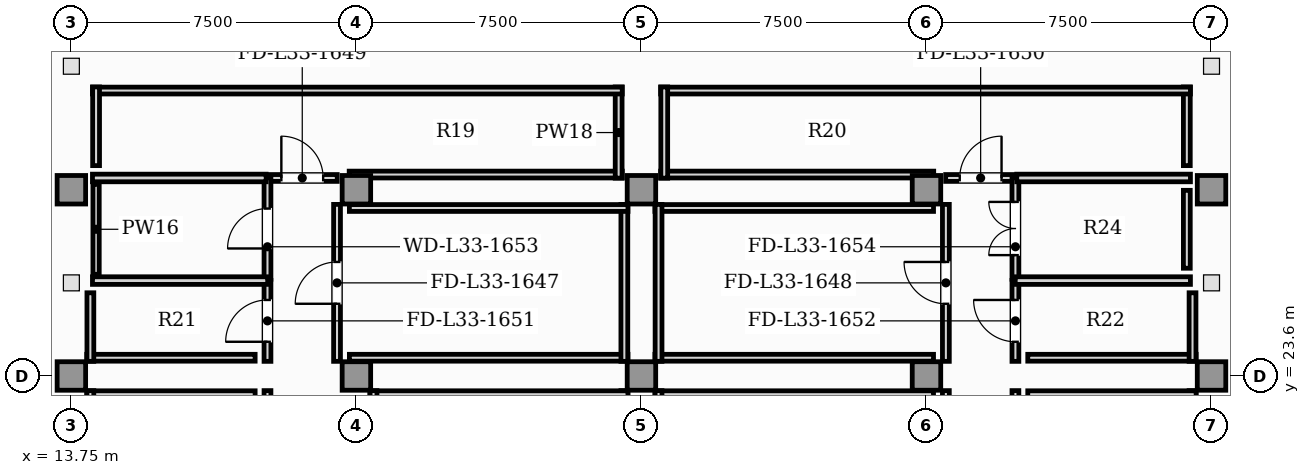
"""IFC4 building model, lengths in metres.
Left out: names, types, materials, properties, quantities, classifications, styles, units other than length and angle.
Written with IfcOpenShell. Run it as: python <this file> out.ifc"""

import sys

from ifc_helpers import new_model, si_unit, direction, frame, frame_2d, origin, origin_2d, place, context, subcontext, project, spatial, rectangle, extrude, element, fill, save


model = new_model("IFC4")
c1 = context("Model", 3, precision=1e-05, world=origin(), true_north=direction((0.0, 1.0)))
c2 = subcontext(c1, "Body", "Model", "MODEL_VIEW")
j1 = project(units=[si_unit("LENGTHUNIT", "METRE"), si_unit("PLANEANGLEUNIT", "RADIAN")], contexts=[c1])
p1 = place(None, origin())
s1 = spatial("IfcSite", under=j1, at=p1, CompositionType="ELEMENT")
p2 = place(p1, origin())
s2 = spatial("IfcBuilding", under=s1, at=p2, CompositionType="ELEMENT")
p3 = place(p2, frame((0.0, 0.0, 134.95)))
s3 = spatial("IfcBuildingStorey", under=s2, at=p3, CompositionType="ELEMENT", Elevation=134.95)
for number, where, z_axis, x_axis in (
    (1, (13.75, 23.6, 0.0), (0.0, 0.0, 1.0), (1.0, 0.0, 0.0)),
    (2, (21.25, 23.6, 0.0), (0.0, 0.0, 1.0), (1.0, 0.0, 0.0)),
    (3, (28.75, 23.6, 0.0), (0.0, 0.0, 1.0), (1.0, 0.0, 0.0)),
    (4, (36.25, 23.6, 0.0), (0.0, 0.0, 1.0), (1.0, 0.0, 0.0)),
    (5, (43.75, 23.6, 0.0), (0.0, 0.0, 1.0), (1.0, 0.0, 0.0)),
    (6, (13.75, 28.5, 0.0), (0.0, 0.0, 1.0), (1.0, 0.0, 0.0)),
    (7, (21.25, 28.5, 0.0), (0.0, 0.0, 1.0), (1.0, 0.0, 0.0)),
    (8, (28.75, 28.5, 0.0), (0.0, 0.0, 1.0), (1.0, 0.0, 0.0)),
    (9, (36.25, 28.5, 0.0), (0.0, 0.0, 1.0), (1.0, 0.0, 0.0)),
    (10, (43.75, 28.5, 0.0), (0.0, 0.0, 1.0), (1.0, 0.0, 0.0)),
):
    element("IfcColumn", number, at=place(p3, frame(where, z_axis=z_axis, x_axis=x_axis)), inside=s3, PredefinedType="COLUMN", context=c2, shape_type="SweptSolid", body=[
        extrude(rectangle(XDim=0.75, YDim=0.75, at=origin_2d()), origin(), (0.0, 0.0, 1.0), 5.2),
    ])
p4 = place(p3, frame((18.91, 13.885, 0.0), z_axis=(0.0, 0.0, 1.0), x_axis=(0.0, 1.0, 0.0)))
e11 = element("IfcWall", 11, at=p4, inside=s3, PredefinedType="PARTITIONING", context=c2, shape_type="SweptSolid", body=[
    extrude(rectangle(XDim=9.33, YDim=0.18, at=frame_2d((4.665, 0.0))), origin(), (0.0, 0.0, 1.0), 4.92),
])
p5 = place(p4, frame((4.115, 0.0, 0.0)))
e12 = element("IfcOpeningElement", 12, at=p5, cuts=e11, PredefinedType="OPENING", context=c2, shape_type="SweptSolid", body=[
    extrude(rectangle(XDim=1.1, YDim=2.2, at=frame_2d((0.55, 1.1))), frame((0.0, 0.1, 0.0), z_axis=(0.0, -1.0, 0.0), x_axis=(1.0, 0.0, 0.0)), (0.0, 0.0, 1.0), 0.2),
])
p6 = place(p3, frame((36.76, 13.885, 0.0), z_axis=(0.0, 0.0, 1.0), x_axis=(0.0, 1.0, 0.0)))
e13 = element("IfcWall", 13, at=p6, inside=s3, PredefinedType="PARTITIONING", context=c2, shape_type="SweptSolid", body=[
    extrude(rectangle(XDim=9.33, YDim=0.18, at=frame_2d((4.665, 0.0))), origin(), (0.0, 0.0, 1.0), 4.92),
])
p7 = place(p6, frame((4.115, 0.0, 0.0)))
e14 = element("IfcOpeningElement", 14, at=p7, cuts=e13, PredefinedType="OPENING", context=c2, shape_type="SweptSolid", body=[
    extrude(rectangle(XDim=1.1, YDim=2.2, at=frame_2d((0.55, 1.1))), frame((0.0, 0.1, 0.0), z_axis=(0.0, -1.0, 0.0), x_axis=(1.0, 0.0, 0.0)), (0.0, 0.0, 1.0), 0.2),
])
p8 = place(p3, frame((38.59, 13.885, 0.0), z_axis=(0.0, 0.0, 1.0), x_axis=(0.0, 1.0, 0.0)))
e15 = element("IfcWall", 15, at=p8, inside=s3, PredefinedType="PARTITIONING", context=c2, shape_type="SweptSolid", body=[
    extrude(rectangle(XDim=9.33, YDim=0.18, at=frame_2d((4.665, 0.0))), origin(), (0.0, 0.0, 1.0), 4.92),
])
p9 = place(p8, frame((4.115, 0.0, 0.0)))
e16 = element("IfcOpeningElement", 16, at=p9, cuts=e15, PredefinedType="OPENING", context=c2, shape_type="SweptSolid", body=[
    extrude(rectangle(XDim=1.1, YDim=2.2, at=frame_2d((0.55, 1.1))), frame((0.0, 0.1, 0.0), z_axis=(0.0, -1.0, 0.0), x_axis=(1.0, 0.0, 0.0)), (0.0, 0.0, 1.0), 0.2),
])
p10 = place(p3, frame((20.74, 23.985, 0.0), z_axis=(0.0, 0.0, 1.0), x_axis=(0.0, 1.0, 0.0)))
e17 = element("IfcWall", 17, at=p10, inside=s3, PredefinedType="PARTITIONING", context=c2, shape_type="SweptSolid", body=[
    extrude(rectangle(XDim=4.13, YDim=0.18, at=frame_2d((2.065, 0.0))), origin(), (0.0, 0.0, 1.0), 4.92),
])
p11 = place(p10, frame((1.515, 0.0, 0.0)))
e18 = element("IfcOpeningElement", 18, at=p11, cuts=e17, PredefinedType="OPENING", context=c2, shape_type="SweptSolid", body=[
    extrude(rectangle(XDim=1.1, YDim=2.2, at=frame_2d((0.55, 1.1))), frame((0.0, 0.1, 0.0), z_axis=(0.0, -1.0, 0.0), x_axis=(1.0, 0.0, 0.0)), (0.0, 0.0, 1.0), 0.2),
])
p12 = place(p3, frame((36.76, 23.985, 0.0), z_axis=(0.0, 0.0, 1.0), x_axis=(0.0, 1.0, 0.0)))
e19 = element("IfcWall", 19, at=p12, inside=s3, PredefinedType="PARTITIONING", context=c2, shape_type="SweptSolid", body=[
    extrude(rectangle(XDim=4.13, YDim=0.18, at=frame_2d((2.065, 0.0))), origin(), (0.0, 0.0, 1.0), 4.92),
])
p13 = place(p12, frame((1.515, 0.0, 0.0)))
e20 = element("IfcOpeningElement", 20, at=p13, cuts=e19, PredefinedType="OPENING", context=c2, shape_type="SweptSolid", body=[
    extrude(rectangle(XDim=1.1, YDim=2.2, at=frame_2d((0.55, 1.1))), frame((0.0, 0.1, 0.0), z_axis=(0.0, -1.0, 0.0), x_axis=(1.0, 0.0, 0.0)), (0.0, 0.0, 1.0), 0.2),
])
p14 = place(p3, frame((18.905, 28.81, 0.0), z_axis=(0.0, 0.0, 1.0), x_axis=(1.0, 0.0, 0.0)))
e21 = element("IfcWall", 21, at=p14, inside=s3, PredefinedType="PARTITIONING", context=c2, shape_type="SweptSolid", body=[
    extrude(rectangle(XDim=1.84, YDim=0.18, at=frame_2d((0.92, 0.0))), origin(), (0.0, 0.0, 1.0), 4.92),
])
p15 = place(p14, frame((0.37, 0.0, 0.0)))
e22 = element("IfcOpeningElement", 22, at=p15, cuts=e21, PredefinedType="OPENING", context=c2, shape_type="SweptSolid", body=[
    extrude(rectangle(XDim=1.1, YDim=2.2, at=frame_2d((0.55, 1.1))), frame((0.0, 0.1, 0.0), z_axis=(0.0, -1.0, 0.0), x_axis=(1.0, 0.0, 0.0)), (0.0, 0.0, 1.0), 0.2),
])
p16 = place(p3, frame((36.755, 28.81, 0.0), z_axis=(0.0, 0.0, 1.0), x_axis=(1.0, 0.0, 0.0)))
e23 = element("IfcWall", 23, at=p16, inside=s3, PredefinedType="PARTITIONING", context=c2, shape_type="SweptSolid", body=[
    extrude(rectangle(XDim=1.84, YDim=0.18, at=frame_2d((0.92, 0.0))), origin(), (0.0, 0.0, 1.0), 4.92),
])
p17 = place(p16, frame((0.37, 0.0, 0.0)))
e24 = element("IfcOpeningElement", 24, at=p17, cuts=e23, PredefinedType="OPENING", context=c2, shape_type="SweptSolid", body=[
    extrude(rectangle(XDim=1.1, YDim=2.2, at=frame_2d((0.55, 1.1))), frame((0.0, 0.1, 0.0), z_axis=(0.0, -1.0, 0.0), x_axis=(1.0, 0.0, 0.0)), (0.0, 0.0, 1.0), 0.2),
])
p18 = place(p3, frame((18.91, 23.985, 0.0), z_axis=(0.0, 0.0, 1.0), x_axis=(0.0, 1.0, 0.0)))
e25 = element("IfcWall", 25, at=p18, inside=s3, PredefinedType="PARTITIONING", context=c2, shape_type="SweptSolid", body=[
    extrude(rectangle(XDim=2.13, YDim=0.18, at=frame_2d((1.065, 0.0))), origin(), (0.0, 0.0, 1.0), 4.92),
])
p19 = place(p18, frame((0.515, 0.0, 0.0)))
e26 = element("IfcOpeningElement", 26, at=p19, cuts=e25, PredefinedType="OPENING", context=c2, shape_type="SweptSolid", body=[
    extrude(rectangle(XDim=1.1, YDim=2.2, at=frame_2d((0.55, 1.1))), frame((0.0, 0.1, 0.0), z_axis=(0.0, -1.0, 0.0), x_axis=(1.0, 0.0, 0.0)), (0.0, 0.0, 1.0), 0.2),
])
p20 = place(p3, frame((38.59, 23.985, 0.0), z_axis=(0.0, 0.0, 1.0), x_axis=(0.0, 1.0, 0.0)))
e27 = element("IfcWall", 27, at=p20, inside=s3, PredefinedType="PARTITIONING", context=c2, shape_type="SweptSolid", body=[
    extrude(rectangle(XDim=2.13, YDim=0.18, at=frame_2d((1.065, 0.0))), origin(), (0.0, 0.0, 1.0), 4.92),
])
p21 = place(p20, frame((0.515, 0.0, 0.0)))
e28 = element("IfcOpeningElement", 28, at=p21, cuts=e27, PredefinedType="OPENING", context=c2, shape_type="SweptSolid", body=[
    extrude(rectangle(XDim=1.1, YDim=2.2, at=frame_2d((0.55, 1.1))), frame((0.0, 0.1, 0.0), z_axis=(0.0, -1.0, 0.0), x_axis=(1.0, 0.0, 0.0)), (0.0, 0.0, 1.0), 0.2),
])
p22 = place(p3, frame((18.91, 26.145, 0.0), z_axis=(0.0, 0.0, 1.0), x_axis=(0.0, 1.0, 0.0)))
e29 = element("IfcWall", 29, at=p22, inside=s3, PredefinedType="PARTITIONING", context=c2, shape_type="SweptSolid", body=[
    extrude(rectangle(XDim=2.67, YDim=0.18, at=frame_2d((1.335, 0.0))), origin(), (0.0, 0.0, 1.0), 4.92),
])
p23 = place(p22, frame((0.81, 0.0, 0.0)))
e30 = element("IfcOpeningElement", 30, at=p23, cuts=e29, PredefinedType="OPENING", context=c2, shape_type="SweptSolid", body=[
    extrude(rectangle(XDim=1.05, YDim=2.15, at=frame_2d((0.525, 1.075))), frame((0.0, 0.1, 0.0), z_axis=(0.0, -1.0, 0.0), x_axis=(1.0, 0.0, 0.0)), (0.0, 0.0, 1.0), 0.2),
])
p24 = place(p3, frame((38.59, 26.145, 0.0), z_axis=(0.0, 0.0, 1.0), x_axis=(0.0, 1.0, 0.0)))
e31 = element("IfcWall", 31, at=p24, inside=s3, PredefinedType="PARTITIONING", context=c2, shape_type="SweptSolid", body=[
    extrude(rectangle(XDim=2.67, YDim=0.18, at=frame_2d((1.335, 0.0))), origin(), (0.0, 0.0, 1.0), 4.92),
])
p25 = place(p24, frame((0.635, 0.0, 0.0)))
e32 = element("IfcOpeningElement", 32, at=p25, cuts=e31, PredefinedType="OPENING", context=c2, shape_type="SweptSolid", body=[
    extrude(rectangle(XDim=1.4, YDim=2.2, at=frame_2d((0.7, 1.1))), frame((0.0, 0.1, 0.0), z_axis=(0.0, -1.0, 0.0), x_axis=(1.0, 0.0, 0.0)), (0.0, 0.0, 1.0), 0.2),
])
for number, where, z_axis, x_axis in (
    (33, (14.305, 28.81, 0.0), (0.0, 0.0, 1.0), (1.0, 0.0, 0.0)),
    (34, (38.625, 28.81, 0.0), (0.0, 0.0, 1.0), (1.0, 0.0, 0.0)),
):
    element("IfcWall", number, at=place(p3, frame(where, z_axis=z_axis, x_axis=x_axis)), inside=s3, PredefinedType="PARTITIONING", context=c2, shape_type="SweptSolid", body=[
        extrude(rectangle(XDim=4.57, YDim=0.2, at=frame_2d((2.285, 0.0))), origin(), (0.0, 0.0, 1.0), 4.92),
    ])
for number, where, z_axis, x_axis in (
    (35, (14.305, 26.11, 0.0), (0.0, 0.0, 1.0), (1.0, 0.0, 0.0)),
    (36, (38.585, 26.11, 0.0), (0.0, 0.0, 1.0), (1.0, 0.0, 0.0)),
):
    element("IfcWall", number, at=place(p3, frame(where, z_axis=z_axis, x_axis=x_axis)), inside=s3, PredefinedType="PARTITIONING", context=c2, shape_type="SweptSolid", body=[
        extrude(rectangle(XDim=4.61, YDim=0.2, at=frame_2d((2.305, 0.0))), origin(), (0.0, 0.0, 1.0), 4.92),
    ])
p26 = place(p3, frame((18.585, 23.12, 0.0), z_axis=(0.0, 0.0, 1.0), x_axis=(-1.0, 0.0, 0.0)))
e37 = element("IfcWall", 37, at=p26, inside=s3, PredefinedType="PARTITIONING", context=c2, shape_type="SweptSolid", body=[
    extrude(rectangle(XDim=4.43, YDim=0.18, at=frame_2d((2.215, 0.0))), origin(), (0.0, 0.0, 1.0), 4.92),
])
p27 = place(p3, frame((14.25, 23.215, 0.0), z_axis=(0.0, 0.0, 1.0), x_axis=(0.0, -1.0, 0.0)))
e38 = element("IfcWall", 38, at=p27, inside=s3, PredefinedType="PARTITIONING", context=c2, shape_type="SweptSolid", body=[
    extrude(rectangle(XDim=9.004, YDim=0.18, at=frame_2d((4.502, 0.0))), origin(), (0.0, 0.0, 1.0), 4.92),
])
p28 = place(p3, frame((28.3, 14.215, 0.0), z_axis=(0.0, 0.0, 1.0), x_axis=(0.0, 1.0, 0.0)))
e39 = element("IfcWall", 39, at=p28, inside=s3, PredefinedType="PARTITIONING", context=c2, shape_type="SweptSolid", body=[
    extrude(rectangle(XDim=9.0, YDim=0.18, at=frame_2d((4.5, 0.0))), origin(), (0.0, 0.0, 1.0), 4.92),
])
p29 = place(p3, frame((28.395, 23.12, 0.0), z_axis=(0.0, 0.0, 1.0), x_axis=(-1.0, 0.0, 0.0)))
e40 = element("IfcWall", 40, at=p29, inside=s3, PredefinedType="PARTITIONING", context=c2, shape_type="SweptSolid", body=[
    extrude(rectangle(XDim=6.79, YDim=0.18, at=frame_2d((3.395, 0.0))), origin(), (0.0, 0.0, 1.0), 4.92),
])
p30 = place(p3, frame((21.7, 23.215, 0.0), z_axis=(0.0, 0.0, 1.0), x_axis=(0.0, -1.0, 0.0)))
e41 = element("IfcWall", 41, at=p30, inside=s3, PredefinedType="PARTITIONING", context=c2, shape_type="SweptSolid", body=[
    extrude(rectangle(XDim=9.0, YDim=0.18, at=frame_2d((4.5, 0.0))), origin(), (0.0, 0.0, 1.0), 4.92),
])
p31 = place(p3, frame((36.435, 23.12, 0.0), z_axis=(0.0, 0.0, 1.0), x_axis=(-1.0, 0.0, 0.0)))
e42 = element("IfcWall", 42, at=p31, inside=s3, PredefinedType="PARTITIONING", context=c2, shape_type="SweptSolid", body=[
    extrude(rectangle(XDim=7.33, YDim=0.18, at=frame_2d((3.665, 0.0))), origin(), (0.0, 0.0, 1.0), 4.92),
])
p32 = place(p3, frame((29.2, 23.215, 0.0), z_axis=(0.0, 0.0, 1.0), x_axis=(0.0, -1.0, 0.0)))
e43 = element("IfcWall", 43, at=p32, inside=s3, PredefinedType="PARTITIONING", context=c2, shape_type="SweptSolid", body=[
    extrude(rectangle(XDim=9.0, YDim=0.18, at=frame_2d((4.5, 0.0))), origin(), (0.0, 0.0, 1.0), 4.92),
])
p33 = place(p3, frame((43.25, 14.211, 0.0), z_axis=(0.0, 0.0, 1.0), x_axis=(0.0, 1.0, 0.0)))
e44 = element("IfcWall", 44, at=p33, inside=s3, PredefinedType="PARTITIONING", context=c2, shape_type="SweptSolid", body=[
    extrude(rectangle(XDim=9.004, YDim=0.18, at=frame_2d((4.502, 0.0))), origin(), (0.0, 0.0, 1.0), 4.92),
])
p34 = place(p3, frame((43.345, 23.12, 0.0), z_axis=(0.0, 0.0, 1.0), x_axis=(-1.0, 0.0, 0.0)))
e45 = element("IfcWall", 45, at=p34, inside=s3, PredefinedType="PARTITIONING", context=c2, shape_type="SweptSolid", body=[
    extrude(rectangle(XDim=4.43, YDim=0.18, at=frame_2d((2.215, 0.0))), origin(), (0.0, 0.0, 1.0), 4.92),
])
p35 = place(p3, frame((21.065, 24.08, 0.0), z_axis=(0.0, 0.0, 1.0), x_axis=(1.0, 0.0, 0.0)))
e46 = element("IfcWall", 46, at=p35, inside=s3, PredefinedType="PARTITIONING", context=c2, shape_type="SweptSolid", body=[
    extrude(rectangle(XDim=7.33, YDim=0.18, at=frame_2d((3.665, 0.0))), origin(), (0.0, 0.0, 1.0), 4.92),
])
p36 = place(p3, frame((28.3, 23.985, 0.0), z_axis=(0.0, 0.0, 1.0), x_axis=(0.0, 1.0, 0.0)))
e47 = element("IfcWall", 47, at=p36, inside=s3, PredefinedType="PARTITIONING", context=c2, shape_type="SweptSolid", body=[
    extrude(rectangle(XDim=4.13, YDim=0.18, at=frame_2d((2.065, 0.0))), origin(), (0.0, 0.0, 1.0), 4.92),
])
for number, where, z_axis, x_axis in (
    (48, (28.395, 28.02, 0.0), (0.0, 0.0, 1.0), (-1.0, 0.0, 0.0)),
    (49, (29.105, 24.08, 0.0), (0.0, 0.0, 1.0), (1.0, 0.0, 0.0)),
    (50, (36.435, 28.02, 0.0), (0.0, 0.0, 1.0), (-1.0, 0.0, 0.0)),
):
    element("IfcWall", number, at=place(p3, frame(where, z_axis=z_axis, x_axis=x_axis)), inside=s3, PredefinedType="PARTITIONING", context=c2, shape_type="SweptSolid", body=[
        extrude(rectangle(XDim=7.33, YDim=0.18, at=frame_2d((3.665, 0.0))), origin(), (0.0, 0.0, 1.0), 4.92),
    ])
p37 = place(p3, frame((29.2, 28.115, 0.0), z_axis=(0.0, 0.0, 1.0), x_axis=(0.0, -1.0, 0.0)))
e51 = element("IfcWall", 51, at=p37, inside=s3, PredefinedType="PARTITIONING", context=c2, shape_type="SweptSolid", body=[
    extrude(rectangle(XDim=4.13, YDim=0.18, at=frame_2d((2.065, 0.0))), origin(), (0.0, 0.0, 1.0), 4.92),
])
p38 = place(p3, frame((21.06, 28.9, 0.0), z_axis=(0.0, 0.0, 1.0), x_axis=(1.0, 0.0, 0.0)))
e52 = element("IfcWall", 52, at=p38, inside=s3, PredefinedType="PARTITIONING", context=c2, shape_type="SweptSolid", body=[
    extrude(rectangle(XDim=7.185, YDim=0.18, at=frame_2d((3.593, 0.0))), origin(), (0.0, 0.0, 1.0), 4.92),
])
p39 = place(p3, frame((28.15, 28.805, 0.0), z_axis=(0.0, 0.0, 1.0), x_axis=(0.0, 1.0, 0.0)))
e53 = element("IfcWall", 53, at=p39, inside=s3, PredefinedType="PARTITIONING", context=c2, shape_type="SweptSolid", body=[
    extrude(rectangle(XDim=2.4, YDim=0.18, at=frame_2d((1.2, 0.0))), origin(), (0.0, 0.0, 1.0), 4.92),
])
p40 = place(p3, frame((28.245, 31.11, 0.0), z_axis=(0.0, 0.0, 1.0), x_axis=(-1.0, 0.0, 0.0)))
e54 = element("IfcWall", 54, at=p40, inside=s3, PredefinedType="PARTITIONING", context=c2, shape_type="SweptSolid", body=[
    extrude(rectangle(XDim=13.94, YDim=0.18, at=frame_2d((6.97, 0.0))), origin(), (0.0, 0.0, 1.0), 4.92),
])
p41 = place(p3, frame((14.4, 31.205, 0.0), z_axis=(0.0, 0.0, 1.0), x_axis=(0.0, -1.0, 0.0)))
e55 = element("IfcWall", 55, at=p41, inside=s3, PredefinedType="PARTITIONING", context=c2, shape_type="SweptSolid", body=[
    extrude(rectangle(XDim=2.07, YDim=0.18, at=frame_2d((1.035, 0.0))), origin(), (0.0, 0.0, 1.0), 4.92),
])
p42 = place(p3, frame((29.255, 28.9, 0.0), z_axis=(0.0, 0.0, 1.0), x_axis=(1.0, 0.0, 0.0)))
e56 = element("IfcWall", 56, at=p42, inside=s3, PredefinedType="PARTITIONING", context=c2, shape_type="SweptSolid", body=[
    extrude(rectangle(XDim=7.185, YDim=0.18, at=frame_2d((3.593, 0.0))), origin(), (0.0, 0.0, 1.0), 4.92),
])
p43 = place(p3, frame((43.1, 29.135, 0.0), z_axis=(0.0, 0.0, 1.0), x_axis=(0.0, 1.0, 0.0)))
e57 = element("IfcWall", 57, at=p43, inside=s3, PredefinedType="PARTITIONING", context=c2, shape_type="SweptSolid", body=[
    extrude(rectangle(XDim=2.07, YDim=0.18, at=frame_2d((1.035, 0.0))), origin(), (0.0, 0.0, 1.0), 4.92),
])
p44 = place(p3, frame((43.195, 31.11, 0.0), z_axis=(0.0, 0.0, 1.0), x_axis=(-1.0, 0.0, 0.0)))
e58 = element("IfcWall", 58, at=p44, inside=s3, PredefinedType="PARTITIONING", context=c2, shape_type="SweptSolid", body=[
    extrude(rectangle(XDim=13.94, YDim=0.18, at=frame_2d((6.97, 0.0))), origin(), (0.0, 0.0, 1.0), 4.92),
])
p45 = place(p3, frame((29.35, 31.205, 0.0), z_axis=(0.0, 0.0, 1.0), x_axis=(0.0, -1.0, 0.0)))
e59 = element("IfcWall", 59, at=p45, inside=s3, PredefinedType="PARTITIONING", context=c2, shape_type="SweptSolid", body=[
    extrude(rectangle(XDim=2.4, YDim=0.18, at=frame_2d((1.2, 0.0))), origin(), (0.0, 0.0, 1.0), 4.92),
])
p46 = place(p3, frame((14.155, 24.08, 0.0), z_axis=(0.0, 0.0, 1.0), x_axis=(1.0, 0.0, 0.0)))
e60 = element("IfcWall", 60, at=p46, inside=s3, PredefinedType="PARTITIONING", context=c2, shape_type="SweptSolid", body=[
    extrude(rectangle(XDim=4.43, YDim=0.18, at=frame_2d((2.215, 0.0))), origin(), (0.0, 0.0, 1.0), 4.92),
])
p47 = place(p3, frame((14.25, 25.789, 0.0), z_axis=(0.0, 0.0, 1.0), x_axis=(0.0, -1.0, 0.0)))
e61 = element("IfcWall", 61, at=p47, inside=s3, PredefinedType="PARTITIONING", context=c2, shape_type="SweptSolid", body=[
    extrude(rectangle(XDim=1.804, YDim=0.18, at=frame_2d((0.902, 0.0))), origin(), (0.0, 0.0, 1.0), 4.92),
])
p48 = place(p3, frame((38.915, 24.08, 0.0), z_axis=(0.0, 0.0, 1.0), x_axis=(1.0, 0.0, 0.0)))
e62 = element("IfcWall", 62, at=p48, inside=s3, PredefinedType="PARTITIONING", context=c2, shape_type="SweptSolid", body=[
    extrude(rectangle(XDim=4.43, YDim=0.18, at=frame_2d((2.215, 0.0))), origin(), (0.0, 0.0, 1.0), 4.92),
])
p49 = place(p3, frame((43.25, 23.985, 0.0), z_axis=(0.0, 0.0, 1.0), x_axis=(0.0, 1.0, 0.0)))
e63 = element("IfcWall", 63, at=p49, inside=s3, PredefinedType="PARTITIONING", context=c2, shape_type="SweptSolid", body=[
    extrude(rectangle(XDim=1.804, YDim=0.18, at=frame_2d((0.902, 0.0))), origin(), (0.0, 0.0, 1.0), 4.92),
])
p50 = place(p3, frame((14.4, 28.645, 0.0), z_axis=(0.0, 0.0, 1.0), x_axis=(0.0, -1.0, 0.0)))
e64 = element("IfcWall", 64, at=p50, inside=s3, PredefinedType="PLUMBINGWALL", context=c2, shape_type="SweptSolid", body=[
    extrude(rectangle(XDim=2.37, YDim=0.165, at=frame_2d((1.185, 0.0))), origin(), (0.0, 0.0, 1.0), 4.92),
])
p51 = place(p3, frame((43.1, 26.435, 0.0), z_axis=(0.0, 0.0, 1.0), x_axis=(0.0, 1.0, 0.0)))
e65 = element("IfcWall", 65, at=p51, inside=s3, PredefinedType="PARTITIONING", context=c2, shape_type="SweptSolid", body=[
    extrude(rectangle(XDim=2.05, YDim=0.18, at=frame_2d((1.025, 0.0))), origin(), (0.0, 0.0, 1.0), 4.92),
])
p52 = place(p11, origin())
e66 = element("IfcDoor", 66, at=p52, inside=s3, OperationType="SINGLE_SWING_LEFT", PredefinedType="DOOR", context=c2, shape_type="SweptSolid", body=[
    extrude(rectangle(XDim=1.1, YDim=2.2, at=frame_2d((0.55, 1.1))), frame((0.0, 0.025, 0.0), z_axis=(0.0, -1.0, 0.0), x_axis=(1.0, 0.0, 0.0)), (0.0, 0.0, 1.0), 0.05),
])
fill(e18, e66)
p53 = place(p13, origin())
e67 = element("IfcDoor", 67, at=p53, inside=s3, OperationType="SINGLE_SWING_RIGHT", PredefinedType="DOOR", context=c2, shape_type="SweptSolid", body=[
    extrude(rectangle(XDim=1.1, YDim=2.2, at=frame_2d((0.55, 1.1))), frame((0.0, 0.025, 0.0), z_axis=(0.0, -1.0, 0.0), x_axis=(1.0, 0.0, 0.0)), (0.0, 0.0, 1.0), 0.05),
])
fill(e20, e67)
p54 = place(p15, origin())
e68 = element("IfcDoor", 68, at=p54, inside=s3, OperationType="SINGLE_SWING_LEFT", PredefinedType="DOOR", context=c2, shape_type="SweptSolid", body=[
    extrude(rectangle(XDim=1.1, YDim=2.2, at=frame_2d((0.55, 1.1))), frame((0.0, 0.025, 0.0), z_axis=(0.0, -1.0, 0.0), x_axis=(1.0, 0.0, 0.0)), (0.0, 0.0, 1.0), 0.05),
])
fill(e22, e68)
p55 = place(p17, origin())
e69 = element("IfcDoor", 69, at=p55, inside=s3, OperationType="SINGLE_SWING_RIGHT", PredefinedType="DOOR", context=c2, shape_type="SweptSolid", body=[
    extrude(rectangle(XDim=1.1, YDim=2.2, at=frame_2d((0.55, 1.1))), frame((0.0, 0.025, 0.0), z_axis=(0.0, -1.0, 0.0), x_axis=(1.0, 0.0, 0.0)), (0.0, 0.0, 1.0), 0.05),
])
fill(e24, e69)
p56 = place(p19, origin())
e70 = element("IfcDoor", 70, at=p56, inside=s3, OperationType="SINGLE_SWING_LEFT", PredefinedType="DOOR", context=c2, shape_type="SweptSolid", body=[
    extrude(rectangle(XDim=1.1, YDim=2.2, at=frame_2d((0.55, 1.1))), frame((0.0, 0.025, 0.0), z_axis=(0.0, -1.0, 0.0), x_axis=(1.0, 0.0, 0.0)), (0.0, 0.0, 1.0), 0.05),
])
fill(e26, e70)
p57 = place(p21, origin())
e71 = element("IfcDoor", 71, at=p57, inside=s3, OperationType="SINGLE_SWING_RIGHT", PredefinedType="DOOR", context=c2, shape_type="SweptSolid", body=[
    extrude(rectangle(XDim=1.1, YDim=2.2, at=frame_2d((0.55, 1.1))), frame((0.0, 0.025, 0.0), z_axis=(0.0, -1.0, 0.0), x_axis=(1.0, 0.0, 0.0)), (0.0, 0.0, 1.0), 0.05),
])
fill(e28, e71)
p58 = place(p23, origin())
e72 = element("IfcDoor", 72, at=p58, inside=s3, OperationType="SINGLE_SWING_LEFT", PredefinedType="DOOR", context=c2, shape_type="SweptSolid", body=[
    extrude(rectangle(XDim=1.05, YDim=2.15, at=frame_2d((0.525, 1.075))), frame((0.0, 0.025, 0.0), z_axis=(0.0, -1.0, 0.0), x_axis=(1.0, 0.0, 0.0)), (0.0, 0.0, 1.0), 0.05),
])
fill(e30, e72)
p59 = place(p25, origin())
e73 = element("IfcDoor", 73, at=p59, inside=s3, OperationType="DOUBLE_DOOR_SINGLE_SWING", PredefinedType="DOOR", context=c2, shape_type="SweptSolid", body=[
    extrude(rectangle(XDim=1.4, YDim=2.2, at=frame_2d((0.7, 1.1))), frame((0.0, 0.025, 0.0), z_axis=(0.0, -1.0, 0.0), x_axis=(1.0, 0.0, 0.0)), (0.0, 0.0, 1.0), 0.05),
])
fill(e32, e73)
save(model, sys.argv[1])
